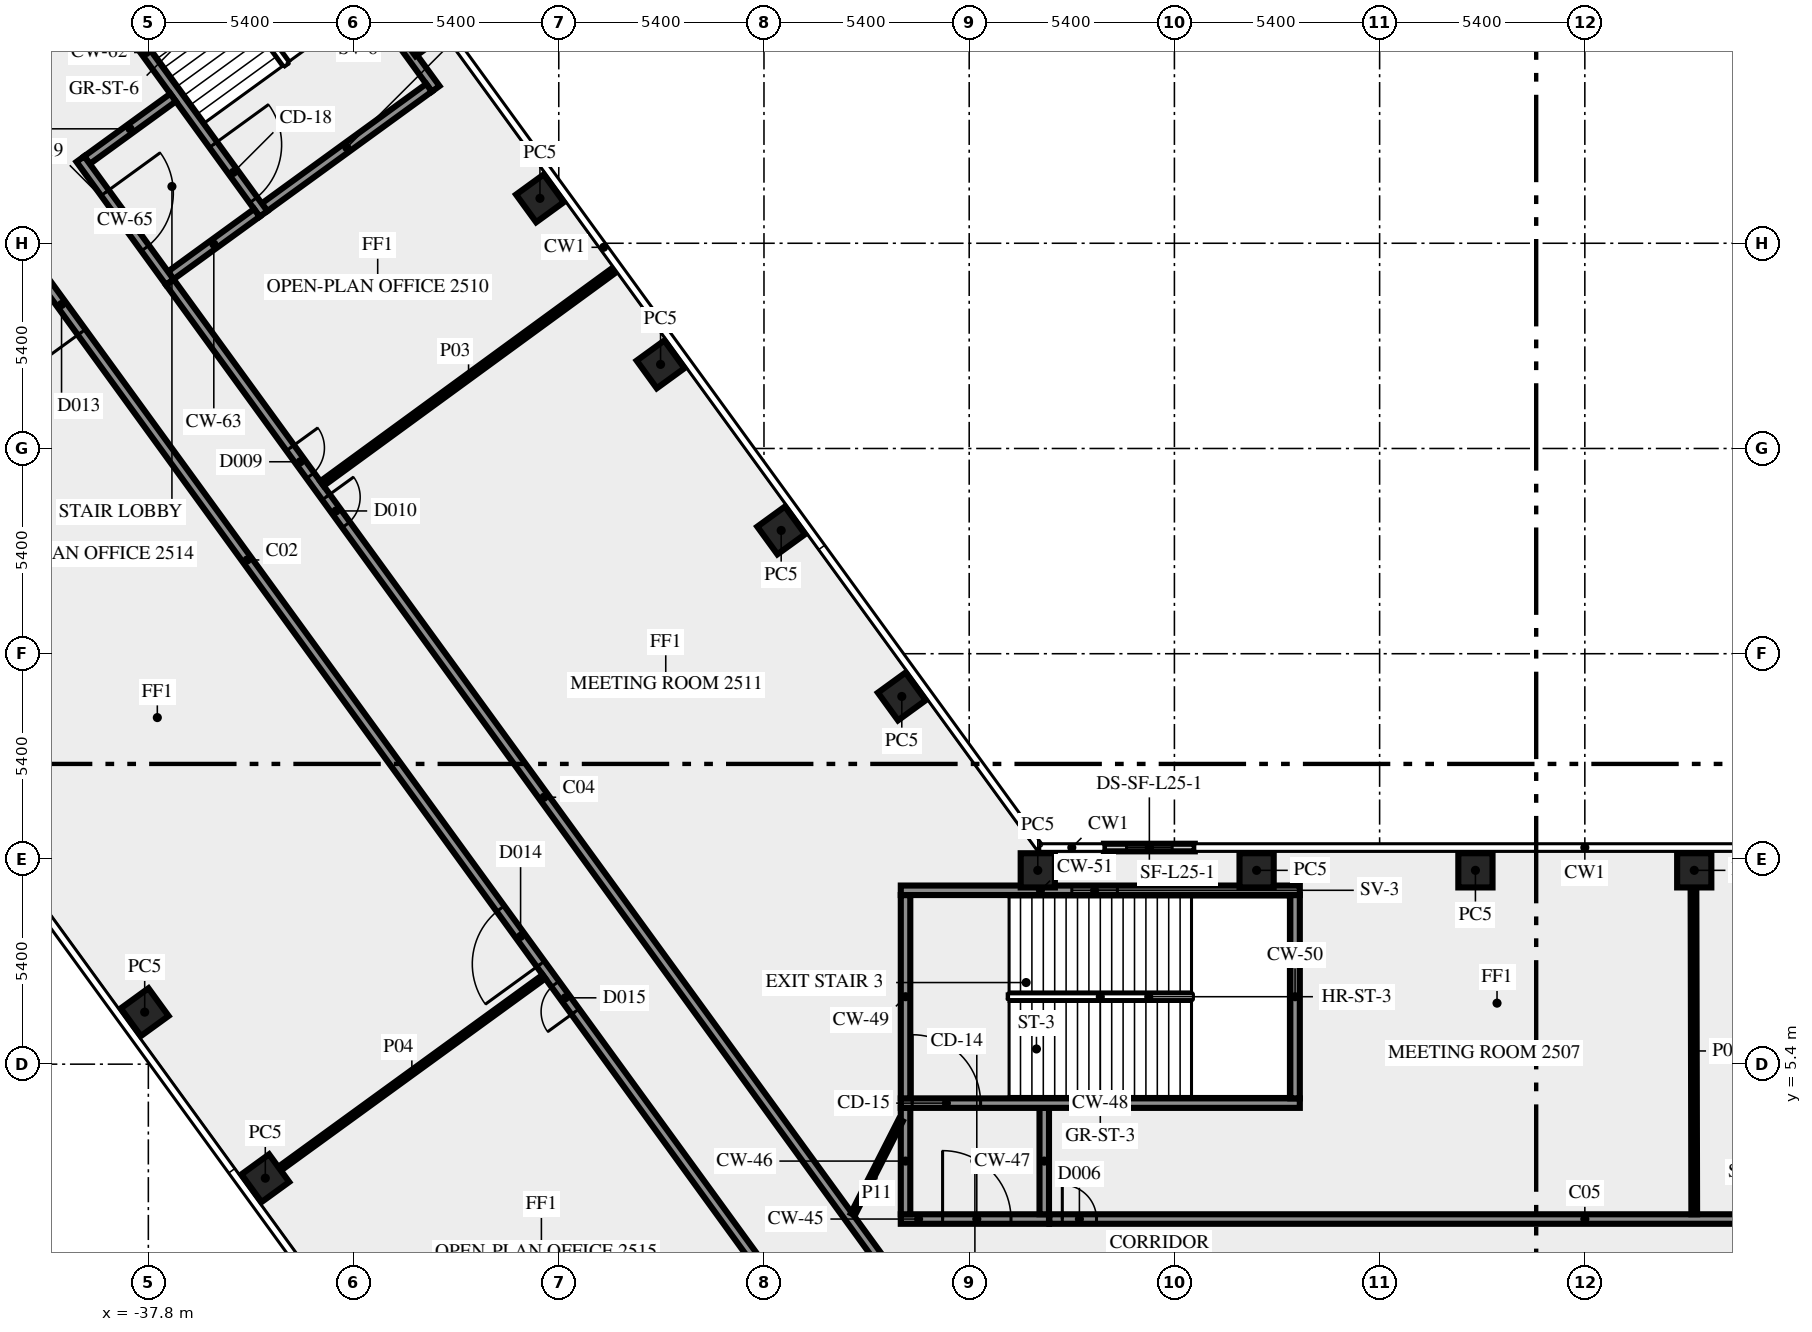
"""IFC4 building model, lengths in metres.
Left out: names, types, materials, properties, quantities, classifications, styles, units other than length and angle.
Written with IfcOpenShell. Run it as: python <this file> out.ifc"""

import sys

from ifc_helpers import new_model, si_unit, direction, frame, frame_2d, origin, origin_2d, place, context, subcontext, project, spatial, rectangle, extrude, element, fill, save


model = new_model("IFC4")
c1 = context("Model", 3, precision=1e-05, world=origin(), true_north=direction((0.0, 1.0)))
c2 = subcontext(c1, "Body", "Model", "MODEL_VIEW")
j1 = project(units=[si_unit("LENGTHUNIT", "METRE"), si_unit("PLANEANGLEUNIT", "RADIAN")], contexts=[c1])
p1 = place(None, origin())
s1 = spatial("IfcSite", under=j1, at=p1, CompositionType="ELEMENT")
p2 = place(p1, origin())
s2 = spatial("IfcBuilding", under=s1, at=p2, CompositionType="ELEMENT")
p3 = place(p2, frame((0.0, 0.0, 109.0)))
s3 = spatial("IfcBuildingStorey", under=s2, at=p3, CompositionType="ELEMENT", Elevation=109.0)
for number, where, z_axis, x_axis in (
    (1, (-17.974, 15.075, 0.0), (0.0, 0.0, 1.0), (-0.588, 0.809, 0.0)),
    (2, (-21.147, 19.444, 0.0), (0.0, 0.0, 1.0), (-0.588, 0.809, 0.0)),
    (3, (-24.321, 23.812, 0.0), (0.0, 0.0, 1.0), (-0.588, 0.809, 0.0)),
    (4, (-27.495, 28.181, 0.0), (0.0, 0.0, 1.0), (-0.588, 0.809, 0.0)),
    (5, (-30.669, 32.55, 0.0), (0.0, 0.0, 1.0), (-0.588, 0.809, 0.0)),
    (6, (-37.896, 6.769, 0.0), (0.0, 0.0, 1.0), (0.588, -0.809, 0.0)),
    (7, (-34.722, 2.4, 0.0), (0.0, 0.0, 1.0), (0.588, -0.809, 0.0)),
    (8, (2.879, 10.5, 0.0), (0.0, 0.0, 1.0), (-1.0, 0.0, 0.0)),
    (9, (-2.879, 10.5, 0.0), (0.0, 0.0, 1.0), (-1.0, 0.0, 0.0)),
    (10, (-8.637, 10.5, 0.0), (0.0, 0.0, 1.0), (-1.0, 0.0, 0.0)),
    (11, (-14.395, 10.5, 0.0), (0.0, 0.0, 1.0), (-1.0, 0.0, 0.0)),
):
    element("IfcColumn", number, at=place(p3, frame(where, z_axis=z_axis, x_axis=x_axis)), inside=s3, PredefinedType="COLUMN", context=c2, shape_type="SweptSolid", body=[
        extrude(rectangle(XDim=0.9, YDim=0.9, at=origin_2d()), origin(), (0.0, 0.0, 1.0), 3.65),
    ])
p4 = place(p3, frame((-10.263, 11.1, 0.0), z_axis=(0.0, 0.0, 1.0), x_axis=(-1.0, 0.0, 0.0)))
e12 = element("IfcWall", 12, at=p4, inside=s3, PredefinedType="SOLIDWALL", context=c2, shape_type="SweptSolid", body=[
    extrude(rectangle(XDim=2.392, YDim=0.2, at=frame_2d((1.196, 0.0))), origin(), (0.0, 0.0, 1.0), 3.65),
])
p5 = place(p4, frame((0.596, 0.0, 1.0)))
e13 = element("IfcOpeningElement", 13, at=p5, cuts=e12, PredefinedType="OPENING", context=c2, shape_type="SweptSolid", body=[
    extrude(rectangle(XDim=1.2, YDim=1.2, at=frame_2d((0.6, 0.6))), frame((0.0, 0.11, 0.0), z_axis=(0.0, -1.0, 0.0), x_axis=(1.0, 0.0, 0.0)), (0.0, 0.0, 1.0), 0.22),
])
p6 = place(p3, frame((-18.0, 1.325, 0.0), z_axis=(0.0, 0.0, 1.0), x_axis=(1.0, 0.0, 0.0)))
e14 = element("IfcWall", 14, at=p6, inside=s3, PredefinedType="SHEAR", context=c2, shape_type="SweptSolid", body=[
    extrude(rectangle(XDim=3.9, YDim=0.25, at=frame_2d((1.95, 0.0))), origin(), (0.0, 0.0, 1.0), 3.65),
])
p7 = place(p6, frame((1.1, 0.0, 0.0)))
e15 = element("IfcOpeningElement", 15, at=p7, cuts=e14, PredefinedType="OPENING", context=c2, shape_type="SweptSolid", body=[
    extrude(rectangle(XDim=1.8, YDim=2.1, at=frame_2d((0.9, 1.05))), frame((0.0, 0.135, 0.0), z_axis=(0.0, -1.0, 0.0), x_axis=(1.0, 0.0, 0.0)), (0.0, 0.0, 1.0), 0.27),
])
for number, where, z_axis, x_axis in (
    (16, (-17.875, 1.45, 0.0), (0.0, 0.0, 1.0), (0.0, 1.0, 0.0)),
    (17, (-14.225, 1.45, 0.0), (0.0, 0.0, 1.0), (0.0, 1.0, 0.0)),
):
    element("IfcWall", number, at=place(p3, frame(where, z_axis=z_axis, x_axis=x_axis)), inside=s3, PredefinedType="SHEAR", context=c2, shape_type="SweptSolid", body=[
        extrude(rectangle(XDim=2.8, YDim=0.25, at=frame_2d((1.4, 0.0))), origin(), (0.0, 0.0, 1.0), 3.65),
    ])
p8 = place(p3, frame((-18.0, 4.375, 0.0), z_axis=(0.0, 0.0, 1.0), x_axis=(1.0, 0.0, 0.0)))
e18 = element("IfcWall", 18, at=p8, inside=s3, PredefinedType="SHEAR", context=c2, shape_type="SweptSolid", body=[
    extrude(rectangle(XDim=10.5, YDim=0.25, at=frame_2d((5.25, 0.0))), origin(), (0.0, 0.0, 1.0), 3.65),
])
p9 = place(p8, frame((0.3, 0.0, 0.0)))
e19 = element("IfcOpeningElement", 19, at=p9, cuts=e18, PredefinedType="OPENING", context=c2, shape_type="SweptSolid", body=[
    extrude(rectangle(XDim=1.8, YDim=2.1, at=frame_2d((0.9, 1.05))), frame((0.0, 0.135, 0.0), z_axis=(0.0, -1.0, 0.0), x_axis=(1.0, 0.0, 0.0)), (0.0, 0.0, 1.0), 0.27),
])
for number, where, z_axis, x_axis in (
    (20, (-17.875, 4.5, 0.0), (0.0, 0.0, 1.0), (0.0, 1.0, 0.0)),
    (21, (-7.625, 4.5, 0.0), (0.0, 0.0, 1.0), (0.0, 1.0, 0.0)),
):
    element("IfcWall", number, at=place(p3, frame(where, z_axis=z_axis, x_axis=x_axis)), inside=s3, PredefinedType="SHEAR", context=c2, shape_type="SweptSolid", body=[
        extrude(rectangle(XDim=5.35, YDim=0.25, at=frame_2d((2.675, 0.0))), origin(), (0.0, 0.0, 1.0), 3.65),
    ])
p10 = place(p3, frame((-18.0, 9.975, 0.0), z_axis=(0.0, 0.0, 1.0), x_axis=(1.0, 0.0, 0.0)))
e22 = element("IfcWall", 22, at=p10, inside=s3, PredefinedType="SHEAR", context=c2, shape_type="SweptSolid", body=[
    extrude(rectangle(XDim=10.5, YDim=0.25, at=frame_2d((5.25, 0.0))), origin(), (0.0, 0.0, 1.0), 3.65),
])
p11 = place(p10, frame((4.5, 0.0, 1.0)))
e23 = element("IfcOpeningElement", 23, at=p11, cuts=e22, PredefinedType="OPENING", context=c2, shape_type="SweptSolid", body=[
    extrude(rectangle(XDim=1.2, YDim=1.2, at=frame_2d((0.6, 0.6))), frame((0.0, 0.135, 0.0), z_axis=(0.0, -1.0, 0.0), x_axis=(1.0, 0.0, 0.0)), (0.0, 0.0, 1.0), 0.27),
])
p12 = place(p3, frame((-30.24, 31.064, 0.0), z_axis=(0.0, 0.0, 1.0), x_axis=(-0.587795589702, 0.809009483706, 0.0)))
e24 = element("IfcWall", 24, at=p12, inside=s3, PredefinedType="SHEAR", context=c2, shape_type="SweptSolid", body=[
    extrude(rectangle(XDim=10.5, YDim=0.25, at=frame_2d((5.25, 0.0))), origin(), (0.0, 0.0, 1.0), 3.65),
])
p13 = place(p12, frame((2.15, 0.0, 1.0)))
e25 = element("IfcOpeningElement", 25, at=p13, cuts=e24, PredefinedType="OPENING", context=c2, shape_type="SweptSolid", body=[
    extrude(rectangle(XDim=1.2, YDim=1.2, at=frame_2d((0.6, 0.6))), frame((0.0, 0.135, 0.0), z_axis=(0.0, -1.0, 0.0), x_axis=(1.0, 0.0, 0.0)), (0.0, 0.0, 1.0), 0.27),
])
p14 = place(p3, frame((-30.414, 31.092, 0.0), z_axis=(0.0, 0.0, 1.0), x_axis=(-0.8089984606, -0.587810760999, 0.0)))
e26 = element("IfcWall", 26, at=p14, inside=s3, PredefinedType="SHEAR", context=c2, shape_type="SweptSolid", body=[
    extrude(rectangle(XDim=5.35, YDim=0.25, at=frame_2d((2.675, 0.0))), origin(), (0.0, 0.0, 1.0), 3.65),
])
p15 = place(p3, frame((-40.942, 36.267, 0.0), z_axis=(0.0, 0.0, 1.0), x_axis=(0.587795589702, -0.809009483706, 0.0)))
e27 = element("IfcWall", 27, at=p15, inside=s3, PredefinedType="SHEAR", context=c2, shape_type="SweptSolid", body=[
    extrude(rectangle(XDim=10.5, YDim=0.25, at=frame_2d((5.25, 0.0))), origin(), (0.0, 0.0, 1.0), 3.65),
])
p16 = place(p15, frame((8.25, 0.0, 0.0)))
e28 = element("IfcOpeningElement", 28, at=p16, cuts=e27, PredefinedType="OPENING", context=c2, shape_type="SweptSolid", body=[
    extrude(rectangle(XDim=1.8, YDim=2.1, at=frame_2d((0.9, 1.05))), frame((0.0, 0.135, 0.0), z_axis=(0.0, -1.0, 0.0), x_axis=(1.0, 0.0, 0.0)), (0.0, 0.0, 1.0), 0.27),
])
for number, where, z_axis, x_axis in (
    (29, (-34.945, 27.8, 0.0), (0.0, 0.0, 1.0), (-0.809, -0.588, 0.0)),
    (30, (-37.149, 30.834, 0.0), (0.0, 0.0, 1.0), (-0.809, -0.588, 0.0)),
):
    element("IfcWall", number, at=place(p3, frame(where, z_axis=z_axis, x_axis=x_axis)), inside=s3, PredefinedType="SHEAR", context=c2, shape_type="SweptSolid", body=[
        extrude(rectangle(XDim=2.8, YDim=0.25, at=frame_2d((1.4, 0.0))), origin(), (0.0, 0.0, 1.0), 3.65),
    ])
p17 = place(p3, frame((-39.589, 29.216, 0.0), z_axis=(0.0, 0.0, 1.0), x_axis=(0.587772420479, -0.809026317077, 0.0)))
e31 = element("IfcWall", 31, at=p17, inside=s3, PredefinedType="SHEAR", context=c2, shape_type="SweptSolid", body=[
    extrude(rectangle(XDim=4.0, YDim=0.25, at=frame_2d((2.0, 0.0))), origin(), (0.0, 0.0, 1.0), 3.65),
])
p18 = place(p17, frame((1.1, 0.0, 0.0)))
e32 = element("IfcOpeningElement", 32, at=p18, cuts=e31, PredefinedType="OPENING", context=c2, shape_type="SweptSolid", body=[
    extrude(rectangle(XDim=1.8, YDim=2.1, at=frame_2d((0.9, 1.05))), frame((0.0, 0.135, 0.0), z_axis=(0.0, -1.0, 0.0), x_axis=(1.0, 0.0, 0.0)), (0.0, 0.0, 1.0), 0.27),
])
p19 = place(p3, frame((-20.531, -1.523, 0.0), z_axis=(0.0, 0.0, 1.0), x_axis=(-0.587784522481, 0.809017524614, 0.0)))
e33 = element("IfcWall", 33, at=p19, inside=s3, PredefinedType="SOLIDWALL", context=c2, shape_type="SweptSolid", body=[
    extrude(rectangle(XDim=49.912, YDim=0.25, at=frame_2d((24.956, 0.0))), origin(), (0.0, 0.0, 1.0), 3.65),
])
p20 = place(p19, frame((10.266, 0.0, 0.0)))
e34 = element("IfcOpeningElement", 34, at=p20, cuts=e33, PredefinedType="OPENING", context=c2, shape_type="SweptSolid", body=[
    extrude(rectangle(XDim=0.9, YDim=2.1, at=frame_2d((0.45, 1.05))), frame((0.0, 0.135, 0.0), z_axis=(0.0, -1.0, 0.0), x_axis=(1.0, 0.0, 0.0)), (0.0, 0.0, 1.0), 0.27),
])
p21 = place(p19, frame((32.366, 0.0, 0.0)))
e35 = element("IfcOpeningElement", 35, at=p21, cuts=e33, PredefinedType="OPENING", context=c2, shape_type="SweptSolid", body=[
    extrude(rectangle(XDim=1.8, YDim=2.1, at=frame_2d((0.9, 1.05))), frame((0.0, 0.135, 0.0), z_axis=(0.0, -1.0, 0.0), x_axis=(1.0, 0.0, 0.0)), (0.0, 0.0, 1.0), 0.27),
])
p22 = place(p19, frame((11.815, 0.0, 0.0)))
e36 = element("IfcOpeningElement", 36, at=p22, cuts=e33, PredefinedType="OPENING", context=c2, shape_type="SweptSolid", body=[
    extrude(rectangle(XDim=1.8, YDim=2.1, at=frame_2d((0.9, 1.05))), frame((0.0, 0.135, 0.0), z_axis=(0.0, -1.0, 0.0), x_axis=(1.0, 0.0, 0.0)), (0.0, 0.0, 1.0), 0.27),
])
p23 = place(p19, frame((48.57, 0.0, 0.0)))
e37 = element("IfcOpeningElement", 37, at=p23, cuts=e33, PredefinedType="OPENING", context=c2, shape_type="SweptSolid", body=[
    extrude(rectangle(XDim=0.9, YDim=2.1, at=frame_2d((0.45, 1.05))), frame((0.0, 0.135, 0.0), z_axis=(0.0, -1.0, 0.0), x_axis=(1.0, 0.0, 0.0)), (0.0, 0.0, 1.0), 0.27),
])
p24 = place(p19, frame((35.915, 0.0, 0.0)))
e38 = element("IfcOpeningElement", 38, at=p24, cuts=e33, PredefinedType="OPENING", context=c2, shape_type="SweptSolid", body=[
    extrude(rectangle(XDim=0.9, YDim=2.1, at=frame_2d((0.45, 1.05))), frame((0.0, 0.135, 0.0), z_axis=(0.0, -1.0, 0.0), x_axis=(1.0, 0.0, 0.0)), (0.0, 0.0, 1.0), 0.27),
])
p25 = place(p3, frame((-37.232, 25.972, 0.0), z_axis=(0.0, 0.0, 1.0), x_axis=(0.587786323093, -0.809016216391, 0.0)))
e39 = element("IfcWall", 39, at=p25, inside=s3, PredefinedType="SOLIDWALL", context=c2, shape_type="SweptSolid", body=[
    extrude(rectangle(XDim=33.493, YDim=0.25, at=frame_2d((16.747, 0.0))), origin(), (0.0, 0.0, 1.0), 3.65),
])
p26 = place(p25, frame((5.385, 0.0, 0.0)))
e40 = element("IfcOpeningElement", 40, at=p26, cuts=e39, PredefinedType="OPENING", context=c2, shape_type="SweptSolid", body=[
    extrude(rectangle(XDim=0.9, YDim=2.1, at=frame_2d((0.45, 1.05))), frame((0.0, 0.135, 0.0), z_axis=(0.0, -1.0, 0.0), x_axis=(1.0, 0.0, 0.0)), (0.0, 0.0, 1.0), 0.27),
])
p27 = place(p25, frame((6.985, 0.0, 0.0)))
e41 = element("IfcOpeningElement", 41, at=p27, cuts=e39, PredefinedType="OPENING", context=c2, shape_type="SweptSolid", body=[
    extrude(rectangle(XDim=0.9, YDim=2.1, at=frame_2d((0.45, 1.05))), frame((0.0, 0.135, 0.0), z_axis=(0.0, -1.0, 0.0), x_axis=(1.0, 0.0, 0.0)), (0.0, 0.0, 1.0), 0.27),
])
p28 = place(p3, frame((-14.09, 1.325, 0.0), z_axis=(0.0, 0.0, 1.0), x_axis=(1.0, 0.0, 0.0)))
e42 = element("IfcWall", 42, at=p28, inside=s3, PredefinedType="SOLIDWALL", context=c2, shape_type="SweptSolid", body=[
    extrude(rectangle(XDim=28.18, YDim=0.25, at=frame_2d((14.09, 0.0))), origin(), (0.0, 0.0, 1.0), 3.65),
])
p29 = place(p28, frame((0.34, 0.0, 0.0)))
e43 = element("IfcOpeningElement", 43, at=p29, cuts=e42, PredefinedType="OPENING", context=c2, shape_type="SweptSolid", body=[
    extrude(rectangle(XDim=0.9, YDim=2.1, at=frame_2d((0.45, 1.05))), frame((0.0, 0.135, 0.0), z_axis=(0.0, -1.0, 0.0), x_axis=(1.0, 0.0, 0.0)), (0.0, 0.0, 1.0), 0.27),
])
p30 = place(p28, frame((26.94, 0.0, 0.0)))
e44 = element("IfcOpeningElement", 44, at=p30, cuts=e42, PredefinedType="OPENING", context=c2, shape_type="SweptSolid", body=[
    extrude(rectangle(XDim=0.9, YDim=2.1, at=frame_2d((0.45, 1.05))), frame((0.0, 0.135, 0.0), z_axis=(0.0, -1.0, 0.0), x_axis=(1.0, 0.0, 0.0)), (0.0, 0.0, 1.0), 0.27),
])
p31 = place(p3, frame((-33.23, 20.677, 0.0), z_axis=(0.0, 0.0, 1.0), x_axis=(0.807610282865, 0.589716568371, 0.0)))
e45 = element("IfcWall", 45, at=p31, inside=s3, PredefinedType="PARTITIONING", context=c2, shape_type="SweptSolid", body=[
    extrude(rectangle(XDim=9.55, YDim=0.15, at=frame_2d((4.775, 0.0))), origin(), (0.0, 0.0, 1.0), 2.75),
])
p32 = place(p3, frame((-27.389, 7.703, 0.0), z_axis=(0.0, 0.0, 1.0), x_axis=(-0.809052894195, -0.587735837256, 0.0)))
e46 = element("IfcWall", 46, at=p32, inside=s3, PredefinedType="PARTITIONING", context=c2, shape_type="SweptSolid", body=[
    extrude(rectangle(XDim=8.594, YDim=0.12, at=frame_2d((4.297, 0.0))), origin(), (0.0, 0.0, 1.0), 3.65),
])
p33 = place(p3, frame((2.879, 1.45, 0.0), z_axis=(0.0, 0.0, 1.0), x_axis=(-0.002357613104, 0.999997220826, 0.0)))
e47 = element("IfcWall", 47, at=p33, inside=s3, PredefinedType="PARTITIONING", context=c2, shape_type="SweptSolid", body=[
    extrude(rectangle(XDim=8.595, YDim=0.15, at=frame_2d((4.297, 0.0))), origin(), (0.0, 0.0, 1.0), 3.65),
])
p34 = place(p3, frame((-41.166, 31.599, 0.0), z_axis=(0.0, 0.0, 1.0), x_axis=(0.809090262332, 0.587684394381, 0.0)))
e48 = element("IfcWall", 48, at=p34, inside=s3, PredefinedType="PARTITIONING", context=c2, shape_type="SweptSolid", body=[
    extrude(rectangle(XDim=2.801, YDim=0.12, at=frame_2d((1.4, 0.0))), origin(), (0.0, 0.0, 1.0), 3.65),
])
p35 = place(p3, frame((-19.261, 1.45, 0.0), z_axis=(0.0, 0.0, 1.0), x_axis=(0.453950796792, 0.891026752736, 0.0)))
e49 = element("IfcWall", 49, at=p35, inside=s3, PredefinedType="PARTITIONING", context=c2, shape_type="SweptSolid", body=[
    extrude(rectangle(XDim=2.778, YDim=0.12, at=frame_2d((1.389, 0.0))), origin(), (0.0, 0.0, 1.0), 3.65),
])
p36 = place(p5, origin())
e50 = element("IfcWindow", 50, at=p36, inside=s3, PartitioningType="SINGLE_PANEL", PredefinedType="WINDOW", context=c2, shape_type="SweptSolid", body=[
    extrude(rectangle(XDim=1.2, YDim=1.2, at=frame_2d((0.6, 0.6))), frame((0.0, 0.03, 0.0), z_axis=(0.0, -1.0, 0.0), x_axis=(1.0, 0.0, 0.0)), (0.0, 0.0, 1.0), 0.06),
])
fill(e13, e50)
p37 = place(p7, origin())
e51 = element("IfcDoor", 51, at=p37, inside=s3, OperationType="DOUBLE_DOOR_SINGLE_SWING", PredefinedType="DOOR", context=c2, shape_type="SweptSolid", body=[
    extrude(rectangle(XDim=1.8, YDim=2.1, at=frame_2d((0.9, 1.05))), frame((0.0, 0.025, 0.0), z_axis=(0.0, -1.0, 0.0), x_axis=(1.0, 0.0, 0.0)), (0.0, 0.0, 1.0), 0.05),
])
fill(e15, e51)
p38 = place(p9, origin())
e52 = element("IfcDoor", 52, at=p38, inside=s3, OperationType="DOUBLE_DOOR_SINGLE_SWING", PredefinedType="DOOR", context=c2, shape_type="SweptSolid", body=[
    extrude(rectangle(XDim=1.8, YDim=2.1, at=frame_2d((0.9, 1.05))), frame((0.0, 0.025, 0.0), z_axis=(0.0, -1.0, 0.0), x_axis=(1.0, 0.0, 0.0)), (0.0, 0.0, 1.0), 0.05),
])
fill(e19, e52)
p39 = place(p11, origin())
e53 = element("IfcWindow", 53, at=p39, inside=s3, PartitioningType="SINGLE_PANEL", PredefinedType="WINDOW", context=c2, shape_type="SweptSolid", body=[
    extrude(rectangle(XDim=1.2, YDim=1.2, at=frame_2d((0.6, 0.6))), frame((0.0, 0.03, 0.0), z_axis=(0.0, -1.0, 0.0), x_axis=(1.0, 0.0, 0.0)), (0.0, 0.0, 1.0), 0.06),
])
fill(e23, e53)
p40 = place(p16, origin())
e54 = element("IfcDoor", 54, at=p40, inside=s3, OperationType="DOUBLE_DOOR_SINGLE_SWING", PredefinedType="DOOR", context=c2, shape_type="SweptSolid", body=[
    extrude(rectangle(XDim=1.8, YDim=2.1, at=frame_2d((0.9, 1.05))), frame((0.0, 0.025, 0.0), z_axis=(0.0, -1.0, 0.0), x_axis=(1.0, 0.0, 0.0)), (0.0, 0.0, 1.0), 0.05),
])
fill(e28, e54)
p41 = place(p18, origin())
e55 = element("IfcDoor", 55, at=p41, inside=s3, OperationType="DOUBLE_DOOR_SINGLE_SWING", PredefinedType="DOOR", context=c2, shape_type="SweptSolid", body=[
    extrude(rectangle(XDim=1.8, YDim=2.1, at=frame_2d((0.9, 1.05))), frame((0.0, 0.025, 0.0), z_axis=(0.0, -1.0, 0.0), x_axis=(1.0, 0.0, 0.0)), (0.0, 0.0, 1.0), 0.05),
])
fill(e32, e55)
p42 = place(p26, origin())
e56 = element("IfcDoor", 56, at=p42, inside=s3, OperationType="SINGLE_SWING_RIGHT", PredefinedType="DOOR", context=c2, shape_type="SweptSolid", body=[
    extrude(rectangle(XDim=0.9, YDim=2.1, at=frame_2d((0.45, 1.05))), frame((0.0, 0.025, 0.0), z_axis=(0.0, -1.0, 0.0), x_axis=(1.0, 0.0, 0.0)), (0.0, 0.0, 1.0), 0.05),
])
fill(e40, e56)
p43 = place(p20, origin())
e57 = element("IfcDoor", 57, at=p43, inside=s3, OperationType="SINGLE_SWING_RIGHT", PredefinedType="DOOR", context=c2, shape_type="SweptSolid", body=[
    extrude(rectangle(XDim=0.9, YDim=2.1, at=frame_2d((0.45, 1.05))), frame((0.0, 0.025, 0.0), z_axis=(0.0, -1.0, 0.0), x_axis=(1.0, 0.0, 0.0)), (0.0, 0.0, 1.0), 0.05),
])
fill(e34, e57)
p44 = place(p29, origin())
e58 = element("IfcDoor", 58, at=p44, inside=s3, OperationType="SINGLE_SWING_LEFT", PredefinedType="DOOR", context=c2, shape_type="SweptSolid", body=[
    extrude(rectangle(XDim=0.9, YDim=2.1, at=frame_2d((0.45, 1.05))), frame((0.0, 0.025, 0.0), z_axis=(0.0, -1.0, 0.0), x_axis=(1.0, 0.0, 0.0)), (0.0, 0.0, 1.0), 0.05),
])
fill(e43, e58)
p45 = place(p27, origin())
e59 = element("IfcDoor", 59, at=p45, inside=s3, OperationType="SINGLE_SWING_LEFT", PredefinedType="DOOR", context=c2, shape_type="SweptSolid", body=[
    extrude(rectangle(XDim=0.9, YDim=2.1, at=frame_2d((0.45, 1.05))), frame((0.0, 0.025, 0.0), z_axis=(0.0, -1.0, 0.0), x_axis=(1.0, 0.0, 0.0)), (0.0, 0.0, 1.0), 0.05),
])
fill(e41, e59)
p46 = place(p21, origin())
e60 = element("IfcDoor", 60, at=p46, inside=s3, OperationType="DOUBLE_DOOR_SINGLE_SWING", PredefinedType="DOOR", context=c2, shape_type="SweptSolid", body=[
    extrude(rectangle(XDim=1.8, YDim=2.1, at=frame_2d((0.9, 1.05))), frame((0.0, 0.025, 0.0), z_axis=(0.0, -1.0, 0.0), x_axis=(1.0, 0.0, 0.0)), (0.0, 0.0, 1.0), 0.05),
])
fill(e35, e60)
p47 = place(p22, origin())
e61 = element("IfcDoor", 61, at=p47, inside=s3, OperationType="DOUBLE_DOOR_SINGLE_SWING", PredefinedType="DOOR", context=c2, shape_type="SweptSolid", body=[
    extrude(rectangle(XDim=1.8, YDim=2.1, at=frame_2d((0.9, 1.05))), frame((0.0, 0.025, 0.0), z_axis=(0.0, -1.0, 0.0), x_axis=(1.0, 0.0, 0.0)), (0.0, 0.0, 1.0), 0.05),
])
fill(e36, e61)
save(model, sys.argv[1])
